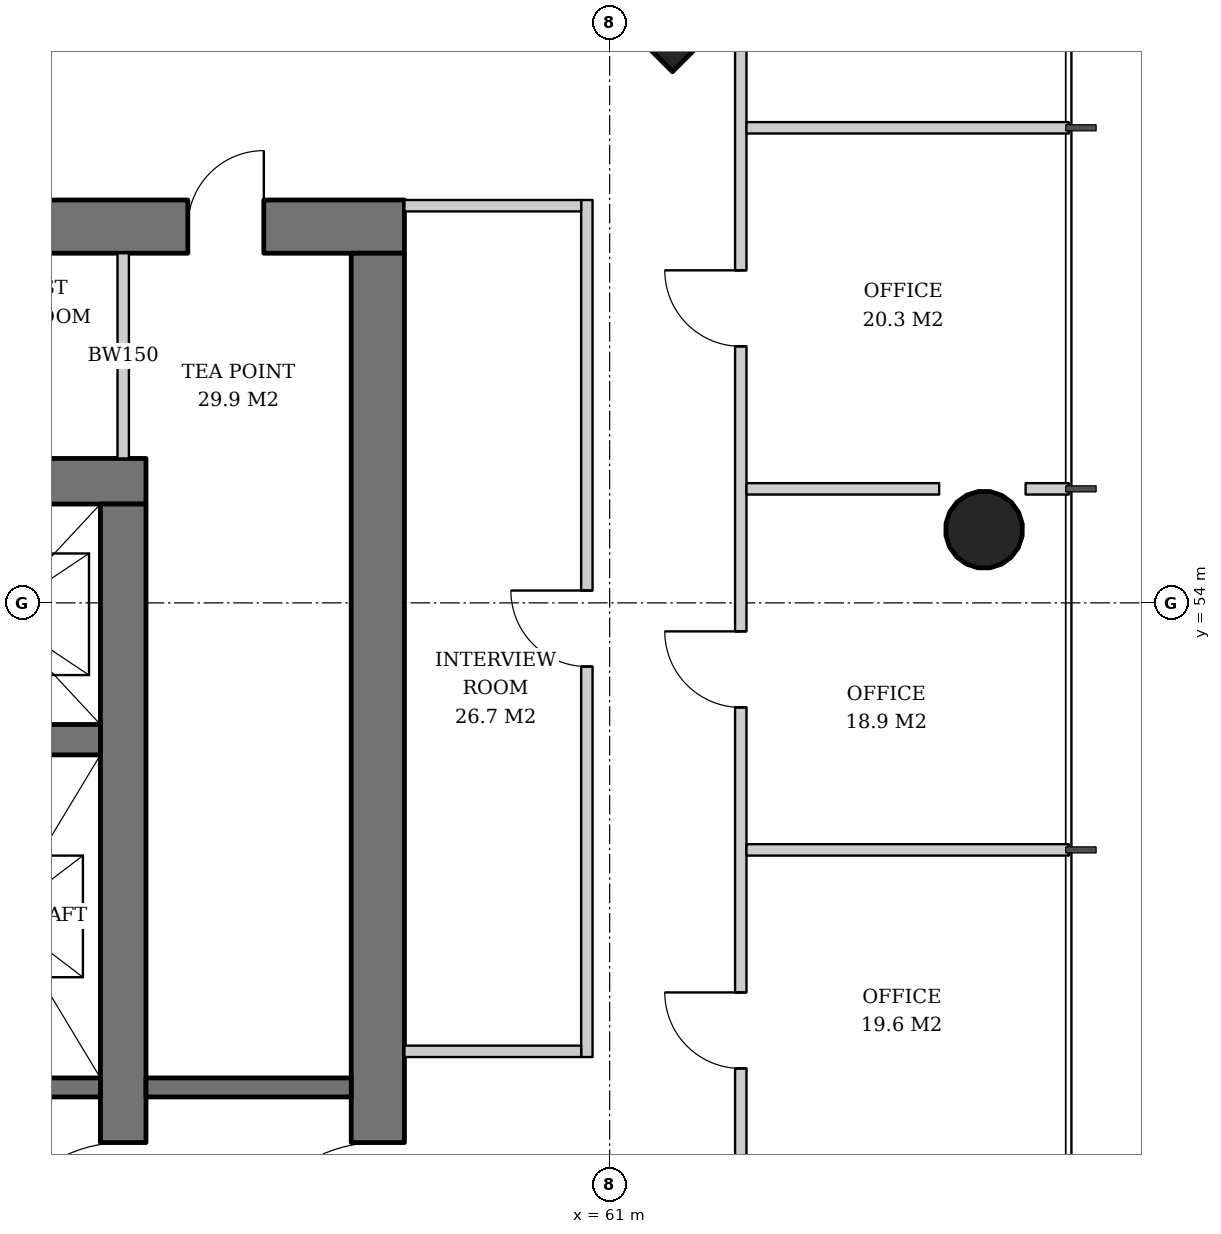
"""IFC4 building model, lengths in metres.
Left out: names, types, materials, properties, quantities, classifications, styles, units other than length and angle.
Written with IfcOpenShell. Run it as: python <this file> out.ifc"""

import sys

from ifc_helpers import new_model, si_unit, direction, frame, frame_2d, origin, origin_2d, place, context, subcontext, project, spatial, rectangle, hollow_circle, extrude, element, fill, save


model = new_model("IFC4")
c1 = context("Model", 3, precision=1e-05, world=origin(), true_north=direction((0.0, 1.0)))
c2 = subcontext(c1, "Body", "Model", "MODEL_VIEW")
j1 = project(units=[si_unit("LENGTHUNIT", "METRE"), si_unit("PLANEANGLEUNIT", "RADIAN")], contexts=[c1])
p1 = place(None, origin())
s1 = spatial("IfcSite", under=j1, at=p1, CompositionType="ELEMENT")
p2 = place(p1, origin())
s2 = spatial("IfcBuilding", under=s1, at=p2, CompositionType="ELEMENT")
p3 = place(p2, frame((0.0, 0.0, 116.0)))
s3 = spatial("IfcBuildingStorey", under=s2, at=p3, CompositionType="ELEMENT", Elevation=116.0)
p4 = place(p3, frame((61.864, 62.864, 0.0), z_axis=(-0.031898107953, -0.031898107953, 0.998981992539), x_axis=(0.707106781187, -0.707106781187, 0.0)))
e1 = element("IfcColumn", 1, at=p4, inside=s3, PredefinedType="COLUMN", context=c2, shape_type="SweptSolid", body=[
    extrude(rectangle(XDim=2.6, YDim=2.6, at=origin_2d()), origin(), (0.0, 0.0, 1.0), 3.804),
])
p5 = place(p3, frame((65.964, 54.982, 0.0), z_axis=(-0.031974409754, -0.015987204877, 0.999360818924), x_axis=(0.4472135955, -0.894427191, 0.0)))
e2 = element("IfcColumn", 2, at=p5, inside=s3, PredefinedType="COLUMN", context=c2, shape_type="SweptSolid", body=[
    extrude(hollow_circle(Radius=0.508, WallThickness=0.04, at=origin_2d()), origin(), (0.0, 0.0, 1.0), 3.802),
])
p6 = place(p3, frame((35.1, 55.6, 0.0), z_axis=(0.0, 0.0, 1.0), x_axis=(1.0, 0.0, 0.0)))
e3 = element("IfcWall", 3, at=p6, inside=s3, PredefinedType="SHEAR", context=c2, shape_type="SweptSolid", body=[
    extrude(rectangle(XDim=19.8, YDim=0.6, at=frame_2d((9.9, 0.0))), origin(), (0.0, 0.0, 1.0), 3.8),
])
p7 = place(p6, frame((14.54, 0.0, 0.0)))
e4 = element("IfcOpeningElement", 4, at=p7, cuts=e3, PredefinedType="OPENING", context=c2, shape_type="SweptSolid", body=[
    extrude(rectangle(XDim=1.0, YDim=2.1, at=frame_2d((0.5, 1.05))), frame((0.0, 0.31, 0.0), z_axis=(0.0, -1.0, 0.0), x_axis=(1.0, 0.0, 0.0)), (0.0, 0.0, 1.0), 0.62),
])
p8 = place(p6, frame((2.425, 0.0, 0.0)))
e5 = element("IfcOpeningElement", 5, at=p8, cuts=e3, PredefinedType="OPENING", context=c2, shape_type="SweptSolid", body=[
    extrude(rectangle(XDim=1.0, YDim=2.1, at=frame_2d((0.5, 1.05))), frame((0.0, 0.31, 0.0), z_axis=(0.0, -1.0, 0.0), x_axis=(1.0, 0.0, 0.0)), (0.0, 0.0, 1.0), 0.62),
])
p9 = place(p3, frame((54.6, 36.7, 0.0), z_axis=(0.0, 0.0, 1.0), x_axis=(0.0, 1.0, 0.0)))
e6 = element("IfcWall", 6, at=p9, inside=s3, PredefinedType="SHEAR", context=c2, shape_type="SweptSolid", body=[
    extrude(rectangle(XDim=18.6, YDim=0.6, at=frame_2d((9.3, 0.0))), origin(), (0.0, 0.0, 1.0), 3.8),
])
p10 = place(p9, frame((8.4, 0.0, 0.0)))
e7 = element("IfcOpeningElement", 7, at=p10, cuts=e6, PredefinedType="OPENING", context=c2, shape_type="SweptSolid", body=[
    extrude(rectangle(XDim=1.8, YDim=2.4, at=frame_2d((0.9, 1.2))), frame((0.0, 0.31, 0.0), z_axis=(0.0, -1.0, 0.0), x_axis=(1.0, 0.0, 0.0)), (0.0, 0.0, 1.0), 0.62),
])
p11 = place(p3, frame((31.7, 58.95, 0.0), z_axis=(0.0, 0.0, 1.0), x_axis=(1.0, 0.0, 0.0)))
e8 = element("IfcWall", 8, at=p11, inside=s3, PredefinedType="SHEAR", context=c2, shape_type="SweptSolid", body=[
    extrude(rectangle(XDim=26.6, YDim=0.7, at=frame_2d((13.3, 0.0))), origin(), (0.0, 0.0, 1.0), 3.8),
])
p12 = place(p11, frame((17.94, 0.0, 0.0)))
e9 = element("IfcOpeningElement", 9, at=p12, cuts=e8, PredefinedType="OPENING", context=c2, shape_type="SweptSolid", body=[
    extrude(rectangle(XDim=1.0, YDim=2.1, at=frame_2d((0.5, 1.05))), frame((0.0, 0.36, 0.0), z_axis=(0.0, -1.0, 0.0), x_axis=(1.0, 0.0, 0.0)), (0.0, 0.0, 1.0), 0.72),
])
p13 = place(p11, frame((5.825, 0.0, 0.0)))
e10 = element("IfcOpeningElement", 10, at=p13, cuts=e8, PredefinedType="OPENING", context=c2, shape_type="SweptSolid", body=[
    extrude(rectangle(XDim=1.0, YDim=2.1, at=frame_2d((0.5, 1.05))), frame((0.0, 0.36, 0.0), z_axis=(0.0, -1.0, 0.0), x_axis=(1.0, 0.0, 0.0)), (0.0, 0.0, 1.0), 0.72),
])
p14 = place(p11, frame((1.551, 0.0, 0.0)))
e11 = element("IfcOpeningElement", 11, at=p14, cuts=e8, PredefinedType="OPENING", context=c2, shape_type="SweptSolid", body=[
    extrude(rectangle(XDim=1.0, YDim=2.1, at=frame_2d((0.5, 1.05))), frame((0.0, 0.36, 0.0), z_axis=(0.0, -1.0, 0.0), x_axis=(1.0, 0.0, 0.0)), (0.0, 0.0, 1.0), 0.72),
])
p15 = place(p11, frame((3.638, 0.0, 0.0)))
e12 = element("IfcOpeningElement", 12, at=p15, cuts=e8, PredefinedType="OPENING", context=c2, shape_type="SweptSolid", body=[
    extrude(rectangle(XDim=1.0, YDim=2.1, at=frame_2d((0.5, 1.05))), frame((0.0, 0.36, 0.0), z_axis=(0.0, -1.0, 0.0), x_axis=(1.0, 0.0, 0.0)), (0.0, 0.0, 1.0), 0.72),
])
p16 = place(p11, frame((11.577, 0.0, 0.0)))
e13 = element("IfcOpeningElement", 13, at=p16, cuts=e8, PredefinedType="OPENING", context=c2, shape_type="SweptSolid", body=[
    extrude(rectangle(XDim=1.0, YDim=2.1, at=frame_2d((0.5, 1.05))), frame((0.0, 0.36, 0.0), z_axis=(0.0, -1.0, 0.0), x_axis=(1.0, 0.0, 0.0)), (0.0, 0.0, 1.0), 0.72),
])
p17 = place(p11, frame((20.9, 0.0, 0.0)))
e14 = element("IfcOpeningElement", 14, at=p17, cuts=e8, PredefinedType="OPENING", context=c2, shape_type="SweptSolid", body=[
    extrude(rectangle(XDim=1.0, YDim=2.1, at=frame_2d((0.5, 1.05))), frame((0.0, 0.36, 0.0), z_axis=(0.0, -1.0, 0.0), x_axis=(1.0, 0.0, 0.0)), (0.0, 0.0, 1.0), 0.72),
])
p18 = place(p11, frame((23.75, 0.0, 0.0)))
e15 = element("IfcOpeningElement", 15, at=p18, cuts=e8, PredefinedType="OPENING", context=c2, shape_type="SweptSolid", body=[
    extrude(rectangle(XDim=1.0, YDim=2.1, at=frame_2d((0.5, 1.05))), frame((0.0, 0.36, 0.0), z_axis=(0.0, -1.0, 0.0), x_axis=(1.0, 0.0, 0.0)), (0.0, 0.0, 1.0), 0.72),
])
p19 = place(p3, frame((57.95, 33.4, 0.0), z_axis=(0.0, 0.0, 1.0), x_axis=(0.0, 1.0, 0.0)))
e16 = element("IfcWall", 16, at=p19, inside=s3, PredefinedType="SHEAR", context=c2, shape_type="SweptSolid", body=[
    extrude(rectangle(XDim=25.2, YDim=0.7, at=frame_2d((12.6, 0.0))), origin(), (0.0, 0.0, 1.0), 3.8),
])
p20 = place(p19, frame((11.7, 0.0, 0.0)))
e17 = element("IfcOpeningElement", 17, at=p20, cuts=e16, PredefinedType="OPENING", context=c2, shape_type="SweptSolid", body=[
    extrude(rectangle(XDim=1.8, YDim=2.4, at=frame_2d((0.9, 1.2))), frame((0.0, 0.36, 0.0), z_axis=(0.0, -1.0, 0.0), x_axis=(1.0, 0.0, 0.0)), (0.0, 0.0, 1.0), 0.72),
])
p21 = place(p3, frame((35.7, 52.2, 0.0), z_axis=(0.0, 0.0, 1.0), x_axis=(1.0, 0.0, 0.0)))
e18 = element("IfcWall", 18, at=p21, inside=s3, PredefinedType="SHEAR", context=c2, shape_type="SweptSolid", body=[
    extrude(rectangle(XDim=18.6, YDim=0.4, at=frame_2d((9.3, 0.0))), origin(), (0.0, 0.0, 1.0), 3.8),
])
p22 = place(p3, frame((48.93, 47.625, 0.0), z_axis=(0.0, 0.0, 1.0), x_axis=(1.0, 0.0, 0.0)))
e19 = element("IfcWall", 19, at=p22, inside=s3, PredefinedType="SHEAR", context=c2, shape_type="SweptSolid", body=[
    extrude(rectangle(XDim=5.37, YDim=0.25, at=frame_2d((2.685, 0.0))), origin(), (0.0, 0.0, 1.0), 3.8),
])
p23 = place(p3, frame((54.9, 47.625, 0.0), z_axis=(0.0, 0.0, 1.0), x_axis=(1.0, 0.0, 0.0)))
e20 = element("IfcWall", 20, at=p23, inside=s3, PredefinedType="SOLIDWALL", context=c2, shape_type="SweptSolid", body=[
    extrude(rectangle(XDim=2.7, YDim=0.25, at=frame_2d((1.35, 0.0))), origin(), (0.0, 0.0, 1.0), 3.62),
])
p24 = place(p3, frame((54.6, 55.9, 0.0), z_axis=(0.0, 0.0, 1.0), x_axis=(0.0, 1.0, 0.0)))
e21 = element("IfcWall", 21, at=p24, inside=s3, PredefinedType="SOLIDWALL", context=c2, shape_type="SweptSolid", body=[
    extrude(rectangle(XDim=2.7, YDim=0.15, at=frame_2d((1.35, 0.0))), origin(), (0.0, 0.0, 1.0), 3.62),
])
p25 = place(p3, frame((60.7, 48.025, 0.0), z_axis=(0.0, 0.0, 1.0), x_axis=(0.0, 1.0, 0.0)))
e22 = element("IfcWall", 22, at=p25, inside=s3, PredefinedType="PARTITIONING", context=c2, shape_type="SweptSolid", body=[
    extrude(rectangle(XDim=11.275, YDim=0.15, at=frame_2d((5.638, 0.0))), origin(), (0.0, 0.0, 1.0), 2.806),
])
p26 = place(p25, frame((5.137, 0.0, 0.0)))
e23 = element("IfcOpeningElement", 23, at=p26, cuts=e22, PredefinedType="OPENING", context=c2, shape_type="SweptSolid", body=[
    extrude(rectangle(XDim=1.0, YDim=2.1, at=frame_2d((0.5, 1.05))), frame((0.0, 0.085, 0.0), z_axis=(0.0, -1.0, 0.0), x_axis=(1.0, 0.0, 0.0)), (0.0, 0.0, 1.0), 0.17),
])
for number, where, z_axis, x_axis in (
    (24, (58.3, 48.1, 0.0), (0.0, 0.0, 1.0), (1.0, 0.0, 0.0)),
    (25, (58.3, 59.225, 0.0), (0.0, 0.0, 1.0), (1.0, 0.0, 0.0)),
):
    element("IfcWall", number, at=place(p3, frame(where, z_axis=z_axis, x_axis=x_axis)), inside=s3, PredefinedType="PARTITIONING", context=c2, shape_type="SweptSolid", body=[
        extrude(rectangle(XDim=2.325, YDim=0.15, at=frame_2d((1.163, 0.0))), origin(), (0.0, 0.0, 1.0), 3.62),
    ])
p27 = place(p3, frame((62.725, 30.188, 0.0), z_axis=(0.0, 0.0, 1.0), x_axis=(0.0, 1.0, 0.0)))
e26 = element("IfcWall", 26, at=p27, inside=s3, PredefinedType="PARTITIONING", context=c2, shape_type="SweptSolid", body=[
    extrude(rectangle(XDim=31.623, YDim=0.15, at=frame_2d((15.812, 0.0))), origin(), (0.0, 0.0, 1.0), 2.72),
])
p28 = place(p27, frame((3.437, 0.0, 0.0)))
e27 = element("IfcOpeningElement", 27, at=p28, cuts=e26, PredefinedType="OPENING", context=c2, shape_type="SweptSolid", body=[
    extrude(rectangle(XDim=1.0, YDim=2.1, at=frame_2d((0.5, 1.05))), frame((0.0, 0.085, 0.0), z_axis=(0.0, -1.0, 0.0), x_axis=(1.0, 0.0, 0.0)), (0.0, 0.0, 1.0), 0.17),
])
p29 = place(p27, frame((8.187, 0.0, 0.0)))
e28 = element("IfcOpeningElement", 28, at=p29, cuts=e26, PredefinedType="OPENING", context=c2, shape_type="SweptSolid", body=[
    extrude(rectangle(XDim=1.0, YDim=2.1, at=frame_2d((0.5, 1.05))), frame((0.0, 0.085, 0.0), z_axis=(0.0, -1.0, 0.0), x_axis=(1.0, 0.0, 0.0)), (0.0, 0.0, 1.0), 0.17),
])
p30 = place(p27, frame((12.937, 0.0, 0.0)))
e29 = element("IfcOpeningElement", 29, at=p30, cuts=e26, PredefinedType="OPENING", context=c2, shape_type="SweptSolid", body=[
    extrude(rectangle(XDim=1.0, YDim=2.1, at=frame_2d((0.5, 1.05))), frame((0.0, 0.085, 0.0), z_axis=(0.0, -1.0, 0.0), x_axis=(1.0, 0.0, 0.0)), (0.0, 0.0, 1.0), 0.17),
])
p31 = place(p27, frame((17.687, 0.0, 0.0)))
e30 = element("IfcOpeningElement", 30, at=p31, cuts=e26, PredefinedType="OPENING", context=c2, shape_type="SweptSolid", body=[
    extrude(rectangle(XDim=1.0, YDim=2.1, at=frame_2d((0.5, 1.05))), frame((0.0, 0.085, 0.0), z_axis=(0.0, -1.0, 0.0), x_axis=(1.0, 0.0, 0.0)), (0.0, 0.0, 1.0), 0.17),
])
p32 = place(p27, frame((22.437, 0.0, 0.0)))
e31 = element("IfcOpeningElement", 31, at=p32, cuts=e26, PredefinedType="OPENING", context=c2, shape_type="SweptSolid", body=[
    extrude(rectangle(XDim=1.0, YDim=2.1, at=frame_2d((0.5, 1.05))), frame((0.0, 0.085, 0.0), z_axis=(0.0, -1.0, 0.0), x_axis=(1.0, 0.0, 0.0)), (0.0, 0.0, 1.0), 0.17),
])
p33 = place(p27, frame((27.187, 0.0, 0.0)))
e32 = element("IfcOpeningElement", 32, at=p33, cuts=e26, PredefinedType="OPENING", context=c2, shape_type="SweptSolid", body=[
    extrude(rectangle(XDim=1.0, YDim=2.1, at=frame_2d((0.5, 1.05))), frame((0.0, 0.085, 0.0), z_axis=(0.0, -1.0, 0.0), x_axis=(1.0, 0.0, 0.0)), (0.0, 0.0, 1.0), 0.17),
])
p34 = place(p3, frame((62.8, 50.75, 0.0), z_axis=(0.0, 0.0, 1.0), x_axis=(1.0, 0.0, 0.0)))
e33 = element("IfcWall", 33, at=p34, inside=s3, PredefinedType="PARTITIONING", context=c2, shape_type="SweptSolid", body=[
    extrude(rectangle(XDim=4.24, YDim=0.15, at=frame_2d((2.12, 0.0))), origin(), (0.0, 0.0, 1.0), 2.82),
])
p35 = place(p3, frame((62.8, 55.5, 0.0), z_axis=(0.0, 0.0, 1.0), x_axis=(1.0, 0.0, 0.0)))
e34 = element("IfcWall", 34, at=p35, inside=s3, PredefinedType="PARTITIONING", context=c2, shape_type="SweptSolid", body=[
    extrude(rectangle(XDim=2.535, YDim=0.15, at=frame_2d((1.268, 0.0))), origin(), (0.0, 0.0, 1.0), 3.62),
])
p36 = place(p3, frame((66.472, 55.5, 0.0), z_axis=(0.0, 0.0, 1.0), x_axis=(1.0, 0.0, 0.0)))
e35 = element("IfcWall", 35, at=p36, inside=s3, PredefinedType="PARTITIONING", context=c2, shape_type="SweptSolid", body=[
    extrude(rectangle(XDim=0.568, YDim=0.15, at=frame_2d((0.284, 0.0))), origin(), (0.0, 0.0, 1.0), 3.62),
])
p37 = place(p3, frame((62.8, 60.25, 0.0), z_axis=(0.0, 0.0, 1.0), x_axis=(1.0, 0.0, 0.0)))
e36 = element("IfcWall", 36, at=p37, inside=s3, PredefinedType="PARTITIONING", context=c2, shape_type="SweptSolid", body=[
    extrude(rectangle(XDim=4.24, YDim=0.15, at=frame_2d((2.12, 0.0))), origin(), (0.0, 0.0, 1.0), 2.82),
])
p38 = place(p10, origin())
e37 = element("IfcDoor", 37, at=p38, inside=s3, OperationType="DOUBLE_DOOR_SINGLE_SWING", PredefinedType="DOOR", context=c2, shape_type="SweptSolid", body=[
    extrude(rectangle(XDim=1.8, YDim=2.4, at=frame_2d((0.9, 1.2))), frame((0.0, 0.025, 0.0), z_axis=(0.0, -1.0, 0.0), x_axis=(1.0, 0.0, 0.0)), (0.0, 0.0, 1.0), 0.05),
])
fill(e7, e37)
p39 = place(p20, origin())
e38 = element("IfcDoor", 38, at=p39, inside=s3, OperationType="DOUBLE_DOOR_SINGLE_SWING", PredefinedType="DOOR", context=c2, shape_type="SweptSolid", body=[
    extrude(rectangle(XDim=1.8, YDim=2.4, at=frame_2d((0.9, 1.2))), frame((0.0, 0.025, 0.0), z_axis=(0.0, -1.0, 0.0), x_axis=(1.0, 0.0, 0.0)), (0.0, 0.0, 1.0), 0.05),
])
fill(e17, e38)
p40 = place(p18, origin())
e39 = element("IfcDoor", 39, at=p40, inside=s3, OperationType="SINGLE_SWING_RIGHT", PredefinedType="DOOR", context=c2, shape_type="SweptSolid", body=[
    extrude(rectangle(XDim=1.0, YDim=2.1, at=frame_2d((0.5, 1.05))), frame((0.0, -0.29, 0.0), z_axis=(0.0, -1.0, 0.0), x_axis=(1.0, 0.0, 0.0)), (0.0, 0.0, 1.0), 0.05),
])
fill(e15, e39)
p41 = place(p26, origin())
e40 = element("IfcDoor", 40, at=p41, inside=s3, OperationType="SINGLE_SWING_RIGHT", PredefinedType="DOOR", context=c2, shape_type="SweptSolid", body=[
    extrude(rectangle(XDim=1.0, YDim=2.1, at=frame_2d((0.5, 1.05))), frame((0.0, 0.025, 0.0), z_axis=(0.0, -1.0, 0.0), x_axis=(1.0, 0.0, 0.0)), (0.0, 0.0, 1.0), 0.05),
])
fill(e23, e40)
p42 = place(p31, origin())
e41 = element("IfcDoor", 41, at=p42, inside=s3, OperationType="SINGLE_SWING_RIGHT", PredefinedType="DOOR", context=c2, shape_type="SweptSolid", body=[
    extrude(rectangle(XDim=1.0, YDim=2.1, at=frame_2d((0.5, 1.05))), frame((0.0, 0.025, 0.0), z_axis=(0.0, -1.0, 0.0), x_axis=(1.0, 0.0, 0.0)), (0.0, 0.0, 1.0), 0.05),
])
fill(e30, e41)
p43 = place(p32, origin())
e42 = element("IfcDoor", 42, at=p43, inside=s3, OperationType="SINGLE_SWING_RIGHT", PredefinedType="DOOR", context=c2, shape_type="SweptSolid", body=[
    extrude(rectangle(XDim=1.0, YDim=2.1, at=frame_2d((0.5, 1.05))), frame((0.0, 0.025, 0.0), z_axis=(0.0, -1.0, 0.0), x_axis=(1.0, 0.0, 0.0)), (0.0, 0.0, 1.0), 0.05),
])
fill(e31, e42)
p44 = place(p33, origin())
e43 = element("IfcDoor", 43, at=p44, inside=s3, OperationType="SINGLE_SWING_RIGHT", PredefinedType="DOOR", context=c2, shape_type="SweptSolid", body=[
    extrude(rectangle(XDim=1.0, YDim=2.1, at=frame_2d((0.5, 1.05))), frame((0.0, 0.025, 0.0), z_axis=(0.0, -1.0, 0.0), x_axis=(1.0, 0.0, 0.0)), (0.0, 0.0, 1.0), 0.05),
])
fill(e32, e43)
save(model, sys.argv[1])
